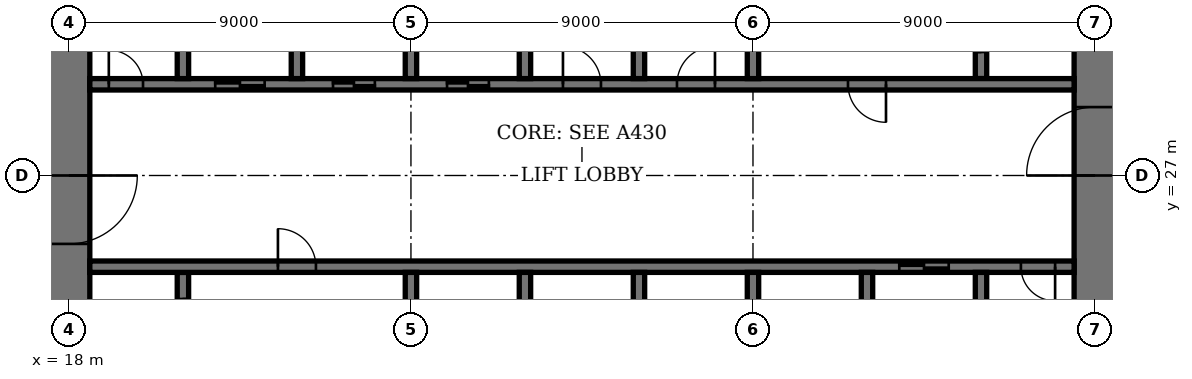
"""IFC4 building model, lengths in metres.
Left out: names, types, materials, properties, quantities, classifications, styles, units other than length and angle.
Written with IfcOpenShell. Run it as: python <this file> out.ifc"""

import sys

from ifc_helpers import new_model, si_unit, direction, frame, frame_2d, origin, place, context, subcontext, project, spatial, rectangle, extrude, element, fill, save


model = new_model("IFC4")
c1 = context("Model", 3, precision=1e-05, world=origin(), true_north=direction((0.0, 1.0)))
c2 = subcontext(c1, "Body", "Model", "MODEL_VIEW")
j1 = project(units=[si_unit("LENGTHUNIT", "METRE"), si_unit("PLANEANGLEUNIT", "RADIAN")], contexts=[c1])
p1 = place(None, origin())
s1 = spatial("IfcSite", under=j1, at=p1, CompositionType="ELEMENT")
p2 = place(p1, origin())
s2 = spatial("IfcBuilding", under=s1, at=p2, CompositionType="ELEMENT")
p3 = place(p2, frame((0.0, 0.0, 218.2)))
s3 = spatial("IfcBuildingStorey", under=s2, at=p3, CompositionType="ELEMENT", Elevation=218.2)
p4 = place(p3, frame((18.0, 35.45, 0.0), z_axis=(0.0, 0.0, 1.0), x_axis=(0.0, -1.0, 0.0)))
e1 = element("IfcWall", 1, at=p4, inside=s3, PredefinedType="SHEAR", context=c2, shape_type="SweptSolid", body=[
    extrude(rectangle(XDim=16.9, YDim=1.1, at=frame_2d((8.45, 0.0))), origin(), (0.0, 0.0, 1.0), 4.0),
])
p5 = place(p4, frame((8.45, 0.0, 0.0)))
e2 = element("IfcOpeningElement", 2, at=p5, cuts=e1, PredefinedType="OPENING", context=c2, shape_type="SweptSolid", body=[
    extrude(rectangle(XDim=1.8, YDim=2.4, at=frame_2d((0.9, 1.2))), frame((0.0, 0.56, 0.0), z_axis=(0.0, -1.0, 0.0), x_axis=(1.0, 0.0, 0.0)), (0.0, 0.0, 1.0), 1.12),
])
p6 = place(p3, frame((45.0, 18.55, 0.0), z_axis=(0.0, 0.0, 1.0), x_axis=(0.0, 1.0, 0.0)))
e3 = element("IfcWall", 3, at=p6, inside=s3, PredefinedType="SHEAR", context=c2, shape_type="SweptSolid", body=[
    extrude(rectangle(XDim=16.9, YDim=1.1, at=frame_2d((8.45, 0.0))), origin(), (0.0, 0.0, 1.0), 4.0),
])
p7 = place(p6, frame((8.45, 0.0, 0.0)))
e4 = element("IfcOpeningElement", 4, at=p7, cuts=e3, PredefinedType="OPENING", context=c2, shape_type="SweptSolid", body=[
    extrude(rectangle(XDim=1.8, YDim=2.4, at=frame_2d((0.9, 1.2))), frame((0.0, 0.56, 0.0), z_axis=(0.0, -1.0, 0.0), x_axis=(1.0, 0.0, 0.0)), (0.0, 0.0, 1.0), 1.12),
])
p8 = place(p3, frame((21.0, 21.95, 0.0), z_axis=(0.0, 0.0, 1.0), x_axis=(0.0, 1.0, 0.0)))
e5 = element("IfcWall", 5, at=p8, inside=s3, PredefinedType="SHEAR", context=c2, shape_type="SweptSolid", body=[
    extrude(rectangle(XDim=2.5, YDim=0.3, at=frame_2d((1.25, 0.0))), origin(), (0.0, 0.0, 1.0), 4.0),
])
p9 = place(p8, frame((0.7, 0.0, 0.0)))
e6 = element("IfcOpeningElement", 6, at=p9, cuts=e5, PredefinedType="OPENING", context=c2, shape_type="SweptSolid", body=[
    extrude(rectangle(XDim=1.1, YDim=2.4, at=frame_2d((0.55, 1.2))), frame((0.0, 0.16, 0.0), z_axis=(0.0, -1.0, 0.0), x_axis=(1.0, 0.0, 0.0)), (0.0, 0.0, 1.0), 0.32),
])
p10 = place(p3, frame((42.0, 29.55, 0.0), z_axis=(0.0, 0.0, 1.0), x_axis=(0.0, 1.0, 0.0)))
e7 = element("IfcWall", 7, at=p10, inside=s3, PredefinedType="SHEAR", context=c2, shape_type="SweptSolid", body=[
    extrude(rectangle(XDim=2.5, YDim=0.3, at=frame_2d((1.25, 0.0))), origin(), (0.0, 0.0, 1.0), 4.0),
])
p11 = place(p10, frame((0.7, 0.0, 0.0)))
e8 = element("IfcOpeningElement", 8, at=p11, cuts=e7, PredefinedType="OPENING", context=c2, shape_type="SweptSolid", body=[
    extrude(rectangle(XDim=1.1, YDim=2.4, at=frame_2d((0.55, 1.2))), frame((0.0, 0.16, 0.0), z_axis=(0.0, -1.0, 0.0), x_axis=(1.0, 0.0, 0.0)), (0.0, 0.0, 1.0), 0.32),
])
p12 = place(p3, frame((18.55, 24.6, 0.0), z_axis=(0.0, 0.0, 1.0), x_axis=(1.0, 0.0, 0.0)))
e9 = element("IfcWall", 9, at=p12, inside=s3, PredefinedType="SHEAR", context=c2, shape_type="SweptSolid", body=[
    extrude(rectangle(XDim=25.9, YDim=0.3, at=frame_2d((12.95, 0.0))), origin(), (0.0, 0.0, 1.0), 4.0),
])
p13 = place(p12, frame((4.95, 0.0, 0.0)))
e10 = element("IfcOpeningElement", 10, at=p13, cuts=e9, PredefinedType="OPENING", context=c2, shape_type="SweptSolid", body=[
    extrude(rectangle(XDim=1.0, YDim=2.4, at=frame_2d((0.5, 1.2))), frame((0.0, 0.16, 0.0), z_axis=(0.0, -1.0, 0.0), x_axis=(1.0, 0.0, 0.0)), (0.0, 0.0, 1.0), 0.32),
])
p14 = place(p12, frame((24.5, 0.0, 0.0)))
e11 = element("IfcOpeningElement", 11, at=p14, cuts=e9, PredefinedType="OPENING", context=c2, shape_type="SweptSolid", body=[
    extrude(rectangle(XDim=0.9, YDim=2.1, at=frame_2d((0.45, 1.05))), frame((0.0, 0.16, 0.0), z_axis=(0.0, -1.0, 0.0), x_axis=(1.0, 0.0, 0.0)), (0.0, 0.0, 1.0), 0.32),
])
p15 = place(p12, frame((21.3, 0.0, 0.0)))
e12 = element("IfcOpeningElement", 12, at=p15, cuts=e9, PredefinedType="OPENING", context=c2, shape_type="SweptSolid", body=[
    extrude(rectangle(XDim=1.3, YDim=2.4, at=frame_2d((0.65, 1.2))), frame((0.0, 0.16, 0.0), z_axis=(0.0, -1.0, 0.0), x_axis=(1.0, 0.0, 0.0)), (0.0, 0.0, 1.0), 0.32),
])
p16 = place(p3, frame((18.55, 29.4, 0.0), z_axis=(0.0, 0.0, 1.0), x_axis=(1.0, 0.0, 0.0)))
e13 = element("IfcWall", 13, at=p16, inside=s3, PredefinedType="SHEAR", context=c2, shape_type="SweptSolid", body=[
    extrude(rectangle(XDim=25.9, YDim=0.3, at=frame_2d((12.95, 0.0))), origin(), (0.0, 0.0, 1.0), 4.0),
])
p17 = place(p16, frame((19.95, 0.0, 0.0)))
e14 = element("IfcOpeningElement", 14, at=p17, cuts=e13, PredefinedType="OPENING", context=c2, shape_type="SweptSolid", body=[
    extrude(rectangle(XDim=1.0, YDim=2.4, at=frame_2d((0.5, 1.2))), frame((0.0, 0.16, 0.0), z_axis=(0.0, -1.0, 0.0), x_axis=(1.0, 0.0, 0.0)), (0.0, 0.0, 1.0), 0.32),
])
p18 = place(p16, frame((0.5, 0.0, 0.0)))
e15 = element("IfcOpeningElement", 15, at=p18, cuts=e13, PredefinedType="OPENING", context=c2, shape_type="SweptSolid", body=[
    extrude(rectangle(XDim=0.9, YDim=2.1, at=frame_2d((0.45, 1.05))), frame((0.0, 0.16, 0.0), z_axis=(0.0, -1.0, 0.0), x_axis=(1.0, 0.0, 0.0)), (0.0, 0.0, 1.0), 0.32),
])
p19 = place(p16, frame((15.45, 0.0, 0.0)))
e16 = element("IfcOpeningElement", 16, at=p19, cuts=e13, PredefinedType="OPENING", context=c2, shape_type="SweptSolid", body=[
    extrude(rectangle(XDim=1.0, YDim=2.4, at=frame_2d((0.5, 1.2))), frame((0.0, 0.16, 0.0), z_axis=(0.0, -1.0, 0.0), x_axis=(1.0, 0.0, 0.0)), (0.0, 0.0, 1.0), 0.32),
])
p20 = place(p16, frame((12.45, 0.0, 0.0)))
e17 = element("IfcOpeningElement", 17, at=p20, cuts=e13, PredefinedType="OPENING", context=c2, shape_type="SweptSolid", body=[
    extrude(rectangle(XDim=1.0, YDim=2.4, at=frame_2d((0.5, 1.2))), frame((0.0, 0.16, 0.0), z_axis=(0.0, -1.0, 0.0), x_axis=(1.0, 0.0, 0.0)), (0.0, 0.0, 1.0), 0.32),
])
p21 = place(p16, frame((9.4, 0.0, 0.0)))
e18 = element("IfcOpeningElement", 18, at=p21, cuts=e13, PredefinedType="OPENING", context=c2, shape_type="SweptSolid", body=[
    extrude(rectangle(XDim=1.1, YDim=2.4, at=frame_2d((0.55, 1.2))), frame((0.0, 0.16, 0.0), z_axis=(0.0, -1.0, 0.0), x_axis=(1.0, 0.0, 0.0)), (0.0, 0.0, 1.0), 0.32),
])
p22 = place(p16, frame((6.4, 0.0, 0.0)))
e19 = element("IfcOpeningElement", 19, at=p22, cuts=e13, PredefinedType="OPENING", context=c2, shape_type="SweptSolid", body=[
    extrude(rectangle(XDim=1.1, YDim=2.4, at=frame_2d((0.55, 1.2))), frame((0.0, 0.16, 0.0), z_axis=(0.0, -1.0, 0.0), x_axis=(1.0, 0.0, 0.0)), (0.0, 0.0, 1.0), 0.32),
])
p23 = place(p16, frame((3.3, 0.0, 0.0)))
e20 = element("IfcOpeningElement", 20, at=p23, cuts=e13, PredefinedType="OPENING", context=c2, shape_type="SweptSolid", body=[
    extrude(rectangle(XDim=1.3, YDim=2.4, at=frame_2d((0.65, 1.2))), frame((0.0, 0.16, 0.0), z_axis=(0.0, -1.0, 0.0), x_axis=(1.0, 0.0, 0.0)), (0.0, 0.0, 1.0), 0.32),
])
for number, where, z_axis, x_axis in (
    (21, (30.0, 21.75, 0.0), (0.0, 0.0, 1.0), (0.0, 1.0, 0.0)),
    (22, (33.0, 29.55, 0.0), (0.0, 0.0, 1.0), (0.0, 1.0, 0.0)),
    (23, (33.0, 21.75, 0.0), (0.0, 0.0, 1.0), (0.0, 1.0, 0.0)),
    (24, (30.0, 29.55, 0.0), (0.0, 0.0, 1.0), (0.0, 1.0, 0.0)),
    (25, (36.0, 21.75, 0.0), (0.0, 0.0, 1.0), (0.0, 1.0, 0.0)),
    (26, (27.0, 29.55, 0.0), (0.0, 0.0, 1.0), (0.0, 1.0, 0.0)),
):
    element("IfcWall", number, at=place(p3, frame(where, z_axis=z_axis, x_axis=x_axis)), inside=s3, PredefinedType="SHEAR", context=c2, shape_type="SweptSolid", body=[
        extrude(rectangle(XDim=2.7, YDim=0.3, at=frame_2d((1.35, 0.0))), origin(), (0.0, 0.0, 1.0), 4.0),
    ])
for number, where, z_axis, x_axis in (
    (27, (39.0, 18.55, 0.0), (0.0, 0.0, 1.0), (0.0, 1.0, 0.0)),
    (28, (24.0, 29.55, 0.0), (0.0, 0.0, 1.0), (0.0, 1.0, 0.0)),
):
    element("IfcWall", number, at=place(p3, frame(where, z_axis=z_axis, x_axis=x_axis)), inside=s3, PredefinedType="SHEAR", context=c2, shape_type="SweptSolid", body=[
        extrude(rectangle(XDim=5.9, YDim=0.3, at=frame_2d((2.95, 0.0))), origin(), (0.0, 0.0, 1.0), 4.0),
    ])
for number, where, z_axis, x_axis in (
    (29, (42.0, 21.75, 0.0), (0.0, 0.0, 1.0), (0.0, 1.0, 0.0)),
    (30, (21.0, 29.55, 0.0), (0.0, 0.0, 1.0), (0.0, 1.0, 0.0)),
):
    element("IfcWall", number, at=place(p3, frame(where, z_axis=z_axis, x_axis=x_axis)), inside=s3, PredefinedType="SHEAR", context=c2, shape_type="SweptSolid", body=[
        extrude(rectangle(XDim=2.7, YDim=0.3, at=frame_2d((1.35, 0.0))), origin(), (0.0, 0.0, 1.0), 4.0),
    ])
for number, where, z_axis, x_axis in (
    (31, (27.0, 21.6, 0.0), (0.0, 0.0, 1.0), (0.0, 1.0, 0.0)),
    (32, (36.0, 29.55, 0.0), (0.0, 0.0, 1.0), (0.0, 1.0, 0.0)),
):
    element("IfcWall", number, at=place(p3, frame(where, z_axis=z_axis, x_axis=x_axis)), inside=s3, PredefinedType="SHEAR", context=c2, shape_type="SweptSolid", body=[
        extrude(rectangle(XDim=2.85, YDim=0.3, at=frame_2d((1.425, 0.0))), origin(), (0.0, 0.0, 1.0), 4.0),
    ])
p24 = place(p5, origin())
e33 = element("IfcDoor", 33, at=p24, inside=s3, OperationType="DOUBLE_DOOR_DOUBLE_SWING", PredefinedType="DOOR", context=c2, shape_type="SweptSolid", body=[
    extrude(rectangle(XDim=1.8, YDim=2.4, at=frame_2d((0.9, 1.2))), frame((0.0, 0.03, 0.0), z_axis=(0.0, -1.0, 0.0), x_axis=(1.0, 0.0, 0.0)), (0.0, 0.0, 1.0), 0.06),
    extrude(rectangle(XDim=0.04, YDim=2.4, at=frame_2d((0.02, 1.2))), frame((0.0, 0.55, 0.0), z_axis=(0.0, -1.0, 0.0), x_axis=(1.0, 0.0, 0.0)), (0.0, 0.0, 1.0), 1.1),
    extrude(rectangle(XDim=0.04, YDim=2.4, at=frame_2d((1.78, 1.2))), frame((0.0, 0.55, 0.0), z_axis=(0.0, -1.0, 0.0), x_axis=(1.0, 0.0, 0.0)), (0.0, 0.0, 1.0), 1.1),
    extrude(rectangle(XDim=1.8, YDim=0.04, at=frame_2d((0.9, 2.38))), frame((0.0, 0.55, 0.0), z_axis=(0.0, -1.0, 0.0), x_axis=(1.0, 0.0, 0.0)), (0.0, 0.0, 1.0), 1.1),
])
fill(e2, e33)
p25 = place(p7, origin())
e34 = element("IfcDoor", 34, at=p25, inside=s3, OperationType="DOUBLE_DOOR_DOUBLE_SWING", PredefinedType="DOOR", context=c2, shape_type="SweptSolid", body=[
    extrude(rectangle(XDim=1.8, YDim=2.4, at=frame_2d((0.9, 1.2))), frame((0.0, 0.03, 0.0), z_axis=(0.0, -1.0, 0.0), x_axis=(1.0, 0.0, 0.0)), (0.0, 0.0, 1.0), 0.06),
    extrude(rectangle(XDim=0.04, YDim=2.4, at=frame_2d((0.02, 1.2))), frame((0.0, 0.55, 0.0), z_axis=(0.0, -1.0, 0.0), x_axis=(1.0, 0.0, 0.0)), (0.0, 0.0, 1.0), 1.1),
    extrude(rectangle(XDim=0.04, YDim=2.4, at=frame_2d((1.78, 1.2))), frame((0.0, 0.55, 0.0), z_axis=(0.0, -1.0, 0.0), x_axis=(1.0, 0.0, 0.0)), (0.0, 0.0, 1.0), 1.1),
    extrude(rectangle(XDim=1.8, YDim=0.04, at=frame_2d((0.9, 2.38))), frame((0.0, 0.55, 0.0), z_axis=(0.0, -1.0, 0.0), x_axis=(1.0, 0.0, 0.0)), (0.0, 0.0, 1.0), 1.1),
])
fill(e4, e34)
p26 = place(p13, origin())
e35 = element("IfcDoor", 35, at=p26, inside=s3, OperationType="SINGLE_SWING_RIGHT", PredefinedType="DOOR", context=c2, shape_type="SweptSolid", body=[
    extrude(rectangle(XDim=1.0, YDim=2.4, at=frame_2d((0.5, 1.2))), frame((0.0, 0.03, 0.0), z_axis=(0.0, -1.0, 0.0), x_axis=(1.0, 0.0, 0.0)), (0.0, 0.0, 1.0), 0.06),
])
fill(e10, e35)
p27 = place(p17, origin())
e36 = element("IfcDoor", 36, at=p27, inside=s3, OperationType="SINGLE_SWING_RIGHT", PredefinedType="DOOR", context=c2, shape_type="SweptSolid", body=[
    extrude(rectangle(XDim=1.0, YDim=2.4, at=frame_2d((0.5, 1.2))), frame((0.0, 0.03, 0.0), z_axis=(0.0, -1.0, 0.0), x_axis=(1.0, 0.0, 0.0)), (0.0, 0.0, 1.0), 0.06),
])
fill(e14, e36)
p28 = place(p14, origin())
e37 = element("IfcDoor", 37, at=p28, inside=s3, OperationType="SINGLE_SWING_RIGHT", PredefinedType="DOOR", context=c2, shape_type="SweptSolid", body=[
    extrude(rectangle(XDim=0.9, YDim=2.1, at=frame_2d((0.45, 1.05))), frame((0.0, 0.03, 0.0), z_axis=(0.0, -1.0, 0.0), x_axis=(1.0, 0.0, 0.0)), (0.0, 0.0, 1.0), 0.06),
])
fill(e11, e37)
p29 = place(p18, origin())
e38 = element("IfcDoor", 38, at=p29, inside=s3, OperationType="SINGLE_SWING_RIGHT", PredefinedType="DOOR", context=c2, shape_type="SweptSolid", body=[
    extrude(rectangle(XDim=0.9, YDim=2.1, at=frame_2d((0.45, 1.05))), frame((0.0, 0.03, 0.0), z_axis=(0.0, -1.0, 0.0), x_axis=(1.0, 0.0, 0.0)), (0.0, 0.0, 1.0), 0.06),
])
fill(e15, e38)
p30 = place(p19, origin())
e39 = element("IfcDoor", 39, at=p30, inside=s3, OperationType="SINGLE_SWING_LEFT", PredefinedType="DOOR", context=c2, shape_type="SweptSolid", body=[
    extrude(rectangle(XDim=1.0, YDim=2.4, at=frame_2d((0.5, 1.2))), frame((0.0, 0.03, 0.0), z_axis=(0.0, -1.0, 0.0), x_axis=(1.0, 0.0, 0.0)), (0.0, 0.0, 1.0), 0.06),
])
fill(e16, e39)
p31 = place(p20, origin())
e40 = element("IfcDoor", 40, at=p31, inside=s3, OperationType="SINGLE_SWING_RIGHT", PredefinedType="DOOR", context=c2, shape_type="SweptSolid", body=[
    extrude(rectangle(XDim=1.0, YDim=2.4, at=frame_2d((0.5, 1.2))), frame((0.0, 0.03, 0.0), z_axis=(0.0, -1.0, 0.0), x_axis=(1.0, 0.0, 0.0)), (0.0, 0.0, 1.0), 0.06),
])
fill(e17, e40)
p32 = place(p21, origin())
e41 = element("IfcDoor", 41, at=p32, inside=s3, OperationType="DOUBLE_DOOR_SLIDING", PredefinedType="DOOR", context=c2, shape_type="SweptSolid", body=[
    extrude(rectangle(XDim=1.1, YDim=2.4, at=frame_2d((0.55, 1.2))), frame((0.0, 0.02, 0.0), z_axis=(0.0, -1.0, 0.0), x_axis=(1.0, 0.0, 0.0)), (0.0, 0.0, 1.0), 0.04),
])
fill(e18, e41)
p33 = place(p22, origin())
e42 = element("IfcDoor", 42, at=p33, inside=s3, OperationType="DOUBLE_DOOR_SLIDING", PredefinedType="DOOR", context=c2, shape_type="SweptSolid", body=[
    extrude(rectangle(XDim=1.1, YDim=2.4, at=frame_2d((0.55, 1.2))), frame((0.0, 0.02, 0.0), z_axis=(0.0, -1.0, 0.0), x_axis=(1.0, 0.0, 0.0)), (0.0, 0.0, 1.0), 0.04),
])
fill(e19, e42)
p34 = place(p15, origin())
e43 = element("IfcDoor", 43, at=p34, inside=s3, OperationType="DOUBLE_DOOR_SLIDING", PredefinedType="DOOR", context=c2, shape_type="SweptSolid", body=[
    extrude(rectangle(XDim=1.3, YDim=2.4, at=frame_2d((0.65, 1.2))), frame((0.0, 0.02, 0.0), z_axis=(0.0, -1.0, 0.0), x_axis=(1.0, 0.0, 0.0)), (0.0, 0.0, 1.0), 0.04),
])
fill(e12, e43)
p35 = place(p23, origin())
e44 = element("IfcDoor", 44, at=p35, inside=s3, OperationType="DOUBLE_DOOR_SLIDING", PredefinedType="DOOR", context=c2, shape_type="SweptSolid", body=[
    extrude(rectangle(XDim=1.3, YDim=2.4, at=frame_2d((0.65, 1.2))), frame((0.0, 0.02, 0.0), z_axis=(0.0, -1.0, 0.0), x_axis=(1.0, 0.0, 0.0)), (0.0, 0.0, 1.0), 0.04),
])
fill(e20, e44)
save(model, sys.argv[1])
